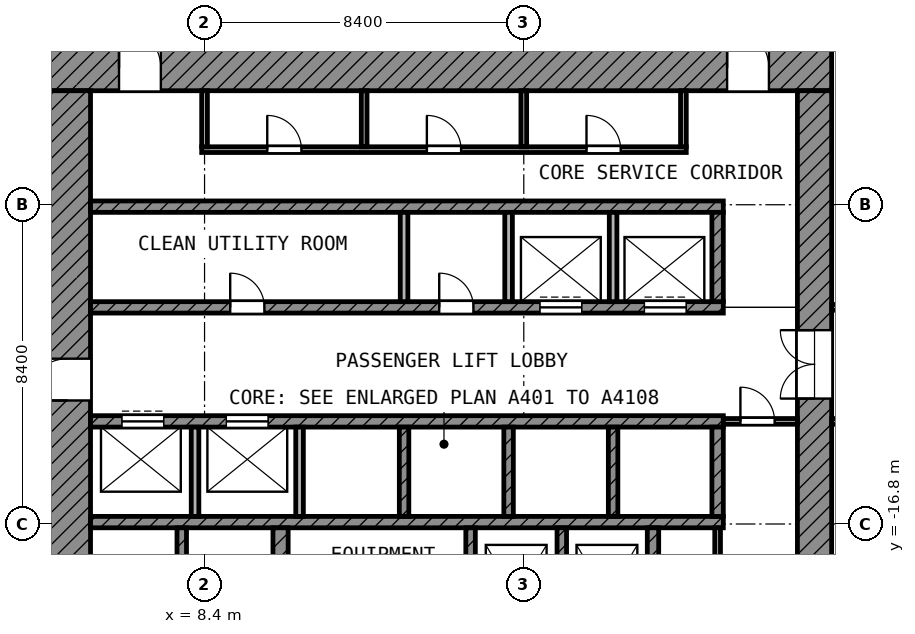
"""IFC4 building model, lengths in metres.
Left out: names, types, materials, properties, quantities, classifications, styles, units other than length and angle.
Written with IfcOpenShell. Run it as: python <this file> out.ifc"""

import sys

from ifc_helpers import new_model, si_unit, direction, frame, frame_2d, origin, place, context, subcontext, project, spatial, rectangle, extrude, element, fill, save


model = new_model("IFC4")
c1 = context("Model", 3, precision=1e-05, world=origin(), true_north=direction((0.0, 1.0)))
c2 = subcontext(c1, "Body", "Model", "MODEL_VIEW")
j1 = project(units=[si_unit("LENGTHUNIT", "METRE"), si_unit("PLANEANGLEUNIT", "RADIAN")], contexts=[c1])
p1 = place(None, origin())
s1 = spatial("IfcSite", under=j1, at=p1, CompositionType="ELEMENT")
p2 = place(p1, origin())
s2 = spatial("IfcBuilding", under=s1, at=p2, CompositionType="ELEMENT")
p3 = place(p2, frame((0.0, 0.0, 187.8)))
s3 = spatial("IfcBuildingStorey", under=s2, at=p3, CompositionType="ELEMENT", Elevation=187.8)
p4 = place(p3, frame((4.2, -4.8, 0.0), z_axis=(0.0, 0.0, 1.0), x_axis=(1.0, 0.0, 0.0)))
e1 = element("IfcWall", 1, at=p4, inside=s3, PredefinedType="SHEAR", context=c2, shape_type="SweptSolid", body=[
    extrude(rectangle(XDim=20.7, YDim=1.2, at=frame_2d((10.35, 0.0))), origin(), (0.0, 0.0, 1.0), 3.6),
])
p5 = place(p4, frame((1.95, 0.0, 0.0)))
e2 = element("IfcOpeningElement", 2, at=p5, cuts=e1, PredefinedType="OPENING", context=c2, shape_type="SweptSolid", body=[
    extrude(rectangle(XDim=1.1, YDim=2.1, at=frame_2d((0.55, 1.05))), frame((0.0, 0.61, 0.0), z_axis=(0.0, -1.0, 0.0), x_axis=(1.0, 0.0, 0.0)), (0.0, 0.0, 1.0), 1.22),
])
p6 = place(p4, frame((17.95, 0.0, 0.0)))
e3 = element("IfcOpeningElement", 3, at=p6, cuts=e1, PredefinedType="OPENING", context=c2, shape_type="SweptSolid", body=[
    extrude(rectangle(XDim=1.1, YDim=2.1, at=frame_2d((0.55, 1.05))), frame((0.0, 0.61, 0.0), z_axis=(0.0, -1.0, 0.0), x_axis=(1.0, 0.0, 0.0)), (0.0, 0.0, 1.0), 1.22),
])
p7 = place(p3, frame((4.8, -24.9, 0.0), z_axis=(0.0, 0.0, 1.0), x_axis=(0.0, 1.0, 0.0)))
e4 = element("IfcWall", 4, at=p7, inside=s3, PredefinedType="SHEAR", context=c2, shape_type="SweptSolid", body=[
    extrude(rectangle(XDim=19.5, YDim=1.2, at=frame_2d((9.75, 0.0))), origin(), (0.0, 0.0, 1.0), 3.6),
])
p8 = place(p7, frame((11.35, 0.0, 0.0)))
e5 = element("IfcOpeningElement", 5, at=p8, cuts=e4, PredefinedType="OPENING", context=c2, shape_type="SweptSolid", body=[
    extrude(rectangle(XDim=1.1, YDim=2.1, at=frame_2d((0.55, 1.05))), frame((0.0, 0.61, 0.0), z_axis=(0.0, -1.0, 0.0), x_axis=(1.0, 0.0, 0.0)), (0.0, 0.0, 1.0), 1.22),
])
p9 = place(p7, frame((2.05, 0.0, 0.0)))
e6 = element("IfcOpeningElement", 6, at=p9, cuts=e4, PredefinedType="OPENING", context=c2, shape_type="SweptSolid", body=[
    extrude(rectangle(XDim=1.1, YDim=2.1, at=frame_2d((0.55, 1.05))), frame((0.0, 0.61, 0.0), z_axis=(0.0, -1.0, 0.0), x_axis=(1.0, 0.0, 0.0)), (0.0, 0.0, 1.0), 1.22),
])
p10 = place(p3, frame((24.45, -24.0, 0.0), z_axis=(0.0, 0.0, 1.0), x_axis=(0.0, 1.0, 0.0)))
e7 = element("IfcWall", 7, at=p10, inside=s3, PredefinedType="SHEAR", context=c2, shape_type="SweptSolid", body=[
    extrude(rectangle(XDim=18.6, YDim=0.9, at=frame_2d((9.3, 0.0))), origin(), (0.0, 0.0, 1.0), 3.6),
])
p11 = place(p10, frame((10.5, 0.0, 0.0)))
e8 = element("IfcOpeningElement", 8, at=p11, cuts=e7, PredefinedType="OPENING", context=c2, shape_type="SweptSolid", body=[
    extrude(rectangle(XDim=1.8, YDim=2.1, at=frame_2d((0.9, 1.05))), frame((0.0, 0.46, 0.0), z_axis=(0.0, -1.0, 0.0), x_axis=(1.0, 0.0, 0.0)), (0.0, 0.0, 1.0), 0.92),
])
p12 = place(p3, frame((5.4, -8.45, 0.0), z_axis=(0.0, 0.0, 1.0), x_axis=(1.0, 0.0, 0.0)))
e9 = element("IfcWall", 9, at=p12, inside=s3, PredefinedType="SHEAR", context=c2, shape_type="SweptSolid", body=[
    extrude(rectangle(XDim=16.65, YDim=0.3, at=frame_2d((8.325, 0.0))), origin(), (0.0, 0.0, 1.0), 3.6),
])
p13 = place(p3, frame((5.4, -11.1, 0.0), z_axis=(0.0, 0.0, 1.0), x_axis=(1.0, 0.0, 0.0)))
e10 = element("IfcWall", 10, at=p13, inside=s3, PredefinedType="SHEAR", context=c2, shape_type="SweptSolid", body=[
    extrude(rectangle(XDim=16.65, YDim=0.3, at=frame_2d((8.325, 0.0))), origin(), (0.0, 0.0, 1.0), 3.6),
])
p14 = place(p13, frame((11.825, 0.0, 0.0)))
e11 = element("IfcOpeningElement", 11, at=p14, cuts=e10, PredefinedType="OPENING", context=c2, shape_type="SweptSolid", body=[
    extrude(rectangle(XDim=1.1, YDim=2.1, at=frame_2d((0.55, 1.05))), frame((0.0, 0.16, 0.0), z_axis=(0.0, -1.0, 0.0), x_axis=(1.0, 0.0, 0.0)), (0.0, 0.0, 1.0), 0.32),
])
p15 = place(p13, frame((14.575, 0.0, 0.0)))
e12 = element("IfcOpeningElement", 12, at=p15, cuts=e10, PredefinedType="OPENING", context=c2, shape_type="SweptSolid", body=[
    extrude(rectangle(XDim=1.1, YDim=2.1, at=frame_2d((0.55, 1.05))), frame((0.0, 0.16, 0.0), z_axis=(0.0, -1.0, 0.0), x_axis=(1.0, 0.0, 0.0)), (0.0, 0.0, 1.0), 0.32),
])
p16 = place(p13, frame((3.675, 0.0, 0.0)))
e13 = element("IfcOpeningElement", 13, at=p16, cuts=e10, PredefinedType="OPENING", context=c2, shape_type="SweptSolid", body=[
    extrude(rectangle(XDim=0.9, YDim=2.1, at=frame_2d((0.45, 1.05))), frame((0.0, 0.16, 0.0), z_axis=(0.0, -1.0, 0.0), x_axis=(1.0, 0.0, 0.0)), (0.0, 0.0, 1.0), 0.32),
])
p17 = place(p13, frame((9.175, 0.0, 0.0)))
e14 = element("IfcOpeningElement", 14, at=p17, cuts=e10, PredefinedType="OPENING", context=c2, shape_type="SweptSolid", body=[
    extrude(rectangle(XDim=0.9, YDim=2.1, at=frame_2d((0.45, 1.05))), frame((0.0, 0.16, 0.0), z_axis=(0.0, -1.0, 0.0), x_axis=(1.0, 0.0, 0.0)), (0.0, 0.0, 1.0), 0.32),
])
p18 = place(p3, frame((5.4, -14.1, 0.0), z_axis=(0.0, 0.0, 1.0), x_axis=(1.0, 0.0, 0.0)))
e15 = element("IfcWall", 15, at=p18, inside=s3, PredefinedType="SHEAR", context=c2, shape_type="SweptSolid", body=[
    extrude(rectangle(XDim=16.65, YDim=0.3, at=frame_2d((8.325, 0.0))), origin(), (0.0, 0.0, 1.0), 3.6),
])
p19 = place(p18, frame((0.825, 0.0, 0.0)))
e16 = element("IfcOpeningElement", 16, at=p19, cuts=e15, PredefinedType="OPENING", context=c2, shape_type="SweptSolid", body=[
    extrude(rectangle(XDim=1.1, YDim=2.1, at=frame_2d((0.55, 1.05))), frame((0.0, 0.16, 0.0), z_axis=(0.0, -1.0, 0.0), x_axis=(1.0, 0.0, 0.0)), (0.0, 0.0, 1.0), 0.32),
])
p20 = place(p18, frame((3.575, 0.0, 0.0)))
e17 = element("IfcOpeningElement", 17, at=p20, cuts=e15, PredefinedType="OPENING", context=c2, shape_type="SweptSolid", body=[
    extrude(rectangle(XDim=1.1, YDim=2.1, at=frame_2d((0.55, 1.05))), frame((0.0, 0.16, 0.0), z_axis=(0.0, -1.0, 0.0), x_axis=(1.0, 0.0, 0.0)), (0.0, 0.0, 1.0), 0.32),
])
p21 = place(p3, frame((5.4, -16.75, 0.0), z_axis=(0.0, 0.0, 1.0), x_axis=(1.0, 0.0, 0.0)))
e18 = element("IfcWall", 18, at=p21, inside=s3, PredefinedType="SHEAR", context=c2, shape_type="SweptSolid", body=[
    extrude(rectangle(XDim=16.65, YDim=0.3, at=frame_2d((8.325, 0.0))), origin(), (0.0, 0.0, 1.0), 3.6),
])
p22 = place(p3, frame((10.4, -20.05, 0.0), z_axis=(0.0, 0.0, 1.0), x_axis=(0.0, 1.0, 0.0)))
e19 = element("IfcWall", 19, at=p22, inside=s3, PredefinedType="SHEAR", context=c2, shape_type="SweptSolid", body=[
    extrude(rectangle(XDim=3.15, YDim=0.4, at=frame_2d((1.575, 0.0))), origin(), (0.0, 0.0, 1.0), 3.6),
])
p23 = place(p3, frame((20.2, -20.35, 0.0), z_axis=(0.0, 0.0, 1.0), x_axis=(0.0, 1.0, 0.0)))
e20 = element("IfcWall", 20, at=p23, inside=s3, PredefinedType="SHEAR", context=c2, shape_type="SweptSolid", body=[
    extrude(rectangle(XDim=3.45, YDim=0.3, at=frame_2d((1.725, 0.0))), origin(), (0.0, 0.0, 1.0), 3.6),
])
p24 = place(p3, frame((21.9, -10.95, 0.0), z_axis=(0.0, 0.0, 1.0), x_axis=(0.0, 1.0, 0.0)))
e21 = element("IfcWall", 21, at=p24, inside=s3, PredefinedType="SHEAR", context=c2, shape_type="SweptSolid", body=[
    extrude(rectangle(XDim=2.35, YDim=0.3, at=frame_2d((1.175, 0.0))), origin(), (0.0, 0.0, 1.0), 3.6),
])
p25 = place(p3, frame((21.9, -16.6, 0.0), z_axis=(0.0, 0.0, 1.0), x_axis=(0.0, 1.0, 0.0)))
e22 = element("IfcWall", 22, at=p25, inside=s3, PredefinedType="SHEAR", context=c2, shape_type="SweptSolid", body=[
    extrude(rectangle(XDim=2.35, YDim=0.3, at=frame_2d((1.175, 0.0))), origin(), (0.0, 0.0, 1.0), 3.6),
])
for number, where, z_axis, x_axis in (
    (23, (7.8, -20.05, 0.0), (0.0, 0.0, 1.0), (0.0, 1.0, 0.0)),
    (24, (15.4, -20.05, 0.0), (0.0, 0.0, 1.0), (0.0, 1.0, 0.0)),
    (25, (17.8, -20.05, 0.0), (0.0, 0.0, 1.0), (0.0, 1.0, 0.0)),
):
    element("IfcWall", number, at=place(p3, frame(where, z_axis=z_axis, x_axis=x_axis)), inside=s3, PredefinedType="SHEAR", context=c2, shape_type="SweptSolid", body=[
        extrude(rectangle(XDim=3.15, YDim=0.25, at=frame_2d((1.575, 0.0))), origin(), (0.0, 0.0, 1.0), 3.6),
    ])
for number, where, z_axis, x_axis in (
    (26, (13.65, -10.95, 0.0), (0.0, 0.0, 1.0), (0.0, 1.0, 0.0)),
    (27, (16.4, -10.95, 0.0), (0.0, 0.0, 1.0), (0.0, 1.0, 0.0)),
    (28, (19.15, -10.95, 0.0), (0.0, 0.0, 1.0), (0.0, 1.0, 0.0)),
):
    element("IfcWall", number, at=place(p3, frame(where, z_axis=z_axis, x_axis=x_axis)), inside=s3, PredefinedType="PARTITIONING", context=c2, shape_type="SweptSolid", body=[
        extrude(rectangle(XDim=2.35, YDim=0.2, at=frame_2d((1.175, 0.0))), origin(), (0.0, 0.0, 1.0), 3.6),
    ])
for number, where, z_axis, x_axis in (
    (29, (8.15, -16.6, 0.0), (0.0, 0.0, 1.0), (0.0, 1.0, 0.0)),
    (30, (10.9, -16.6, 0.0), (0.0, 0.0, 1.0), (0.0, 1.0, 0.0)),
):
    element("IfcWall", number, at=place(p3, frame(where, z_axis=z_axis, x_axis=x_axis)), inside=s3, PredefinedType="PARTITIONING", context=c2, shape_type="SweptSolid", body=[
        extrude(rectangle(XDim=2.35, YDim=0.2, at=frame_2d((1.175, 0.0))), origin(), (0.0, 0.0, 1.0), 3.6),
    ])
for number, where, z_axis, x_axis in (
    (31, (13.65, -16.6, 0.0), (0.0, 0.0, 1.0), (0.0, 1.0, 0.0)),
    (32, (16.4, -16.6, 0.0), (0.0, 0.0, 1.0), (0.0, 1.0, 0.0)),
    (33, (19.15, -16.6, 0.0), (0.0, 0.0, 1.0), (0.0, 1.0, 0.0)),
):
    element("IfcWall", number, at=place(p3, frame(where, z_axis=z_axis, x_axis=x_axis)), inside=s3, PredefinedType="SHEAR", context=c2, shape_type="SweptSolid", body=[
        extrude(rectangle(XDim=2.35, YDim=0.25, at=frame_2d((1.175, 0.0))), origin(), (0.0, 0.0, 1.0), 3.6),
    ])
p26 = place(p3, frame((21.9, -19.05, 0.0), z_axis=(0.0, 0.0, 1.0), x_axis=(0.0, 1.0, 0.0)))
e34 = element("IfcWall", 34, at=p26, inside=s3, PredefinedType="PARTITIONING", context=c2, shape_type="SweptSolid", body=[
    extrude(rectangle(XDim=2.15, YDim=0.15, at=frame_2d((1.075, 0.0))), origin(), (0.0, 0.0, 1.0), 3.6),
])
p27 = place(p3, frame((22.05, -14.1, 0.0), z_axis=(0.0, 0.0, 1.0), x_axis=(1.0, 0.0, 0.0)))
e35 = element("IfcWall", 35, at=p27, inside=s3, PredefinedType="PARTITIONING", context=c2, shape_type="SweptSolid", body=[
    extrude(rectangle(XDim=1.95, YDim=0.15, at=frame_2d((0.975, 0.0))), origin(), (0.0, 0.0, 1.0), 3.6),
])
p28 = place(p27, frame((0.45, 0.0, 0.0)))
e36 = element("IfcOpeningElement", 36, at=p28, cuts=e35, PredefinedType="OPENING", context=c2, shape_type="SweptSolid", body=[
    extrude(rectangle(XDim=0.9, YDim=2.1, at=frame_2d((0.45, 1.05))), frame((0.0, 0.085, 0.0), z_axis=(0.0, -1.0, 0.0), x_axis=(1.0, 0.0, 0.0)), (0.0, 0.0, 1.0), 0.17),
])
p29 = place(p3, frame((8.325, -6.95, 0.0), z_axis=(0.0, 0.0, 1.0), x_axis=(1.0, 0.0, 0.0)))
e37 = element("IfcWall", 37, at=p29, inside=s3, PredefinedType="PARTITIONING", context=c2, shape_type="SweptSolid", body=[
    extrude(rectangle(XDim=12.75, YDim=0.15, at=frame_2d((6.375, 0.0))), origin(), (0.0, 0.0, 1.0), 3.6),
])
p30 = place(p29, frame((1.725, 0.0, 0.0)))
e38 = element("IfcOpeningElement", 38, at=p30, cuts=e37, PredefinedType="OPENING", context=c2, shape_type="SweptSolid", body=[
    extrude(rectangle(XDim=0.9, YDim=2.1, at=frame_2d((0.45, 1.05))), frame((0.0, 0.085, 0.0), z_axis=(0.0, -1.0, 0.0), x_axis=(1.0, 0.0, 0.0)), (0.0, 0.0, 1.0), 0.17),
])
p31 = place(p29, frame((5.925, 0.0, 0.0)))
e39 = element("IfcOpeningElement", 39, at=p31, cuts=e37, PredefinedType="OPENING", context=c2, shape_type="SweptSolid", body=[
    extrude(rectangle(XDim=0.9, YDim=2.1, at=frame_2d((0.45, 1.05))), frame((0.0, 0.085, 0.0), z_axis=(0.0, -1.0, 0.0), x_axis=(1.0, 0.0, 0.0)), (0.0, 0.0, 1.0), 0.17),
])
p32 = place(p29, frame((10.125, 0.0, 0.0)))
e40 = element("IfcOpeningElement", 40, at=p32, cuts=e37, PredefinedType="OPENING", context=c2, shape_type="SweptSolid", body=[
    extrude(rectangle(XDim=0.9, YDim=2.1, at=frame_2d((0.45, 1.05))), frame((0.0, 0.085, 0.0), z_axis=(0.0, -1.0, 0.0), x_axis=(1.0, 0.0, 0.0)), (0.0, 0.0, 1.0), 0.17),
])
for number, where, z_axis, x_axis in (
    (41, (8.4, -6.875, 0.0), (0.0, 0.0, 1.0), (0.0, 1.0, 0.0)),
    (42, (12.6, -6.875, 0.0), (0.0, 0.0, 1.0), (0.0, 1.0, 0.0)),
    (43, (16.8, -6.875, 0.0), (0.0, 0.0, 1.0), (0.0, 1.0, 0.0)),
    (44, (21.0, -6.875, 0.0), (0.0, 0.0, 1.0), (0.0, 1.0, 0.0)),
):
    element("IfcWall", number, at=place(p3, frame(where, z_axis=z_axis, x_axis=x_axis)), inside=s3, PredefinedType="PARTITIONING", context=c2, shape_type="SweptSolid", body=[
        extrude(rectangle(XDim=1.475, YDim=0.15, at=frame_2d((0.738, 0.0))), origin(), (0.0, 0.0, 1.0), 3.6),
    ])
p33 = place(p3, frame((24.9, -14.1, 0.0), z_axis=(0.0, 0.0, 1.0), x_axis=(1.0, 0.0, 0.0)))
e45 = element("IfcWall", 45, at=p33, inside=s3, PredefinedType="PARTITIONING", context=c2, shape_type="SweptSolid", body=[
    extrude(rectangle(XDim=4.425, YDim=0.15, at=frame_2d((2.212, 0.0))), origin(), (0.0, 0.0, 1.0), 3.6),
])
p34 = place(p33, frame((1.65, 0.0, 0.0)))
e46 = element("IfcOpeningElement", 46, at=p34, cuts=e45, PredefinedType="OPENING", context=c2, shape_type="SweptSolid", body=[
    extrude(rectangle(XDim=1.5, YDim=2.1, at=frame_2d((0.75, 1.05))), frame((0.0, 0.085, 0.0), z_axis=(0.0, -1.0, 0.0), x_axis=(1.0, 0.0, 0.0)), (0.0, 0.0, 1.0), 0.17),
])
p35 = place(p3, frame((24.9, -11.1, 0.0), z_axis=(0.0, 0.0, 1.0), x_axis=(1.0, 0.0, 0.0)))
e47 = element("IfcWall", 47, at=p35, inside=s3, PredefinedType="PARTITIONING", context=c2, shape_type="SweptSolid", body=[
    extrude(rectangle(XDim=4.498, YDim=0.15, at=frame_2d((2.249, 0.0))), origin(), (0.0, 0.0, 1.0), 3.6),
])
p36 = place(p35, frame((1.5, 0.0, 0.0)))
e48 = element("IfcOpeningElement", 48, at=p36, cuts=e47, PredefinedType="OPENING", context=c2, shape_type="SweptSolid", body=[
    extrude(rectangle(XDim=1.2, YDim=2.1, at=frame_2d((0.6, 1.05))), frame((0.0, 0.085, 0.0), z_axis=(0.0, -1.0, 0.0), x_axis=(1.0, 0.0, 0.0)), (0.0, 0.0, 1.0), 0.17),
])
p37 = place(p14, origin())
e49 = element("IfcDoor", 49, at=p37, inside=s3, OperationType="DOUBLE_DOOR_SLIDING", PredefinedType="DOOR", context=c2, shape_type="SweptSolid", body=[
    extrude(rectangle(XDim=1.1, YDim=2.1, at=frame_2d((0.55, 1.05))), frame((0.0, 0.025, 0.0), z_axis=(0.0, -1.0, 0.0), x_axis=(1.0, 0.0, 0.0)), (0.0, 0.0, 1.0), 0.05),
])
fill(e11, e49)
p38 = place(p15, origin())
e50 = element("IfcDoor", 50, at=p38, inside=s3, OperationType="DOUBLE_DOOR_SLIDING", PredefinedType="DOOR", context=c2, shape_type="SweptSolid", body=[
    extrude(rectangle(XDim=1.1, YDim=2.1, at=frame_2d((0.55, 1.05))), frame((0.0, 0.025, 0.0), z_axis=(0.0, -1.0, 0.0), x_axis=(1.0, 0.0, 0.0)), (0.0, 0.0, 1.0), 0.05),
])
fill(e12, e50)
p39 = place(p19, origin())
e51 = element("IfcDoor", 51, at=p39, inside=s3, OperationType="DOUBLE_DOOR_SLIDING", PredefinedType="DOOR", context=c2, shape_type="SweptSolid", body=[
    extrude(rectangle(XDim=1.1, YDim=2.1, at=frame_2d((0.55, 1.05))), frame((0.0, 0.025, 0.0), z_axis=(0.0, -1.0, 0.0), x_axis=(1.0, 0.0, 0.0)), (0.0, 0.0, 1.0), 0.05),
])
fill(e16, e51)
p40 = place(p20, origin())
e52 = element("IfcDoor", 52, at=p40, inside=s3, OperationType="DOUBLE_DOOR_SLIDING", PredefinedType="DOOR", context=c2, shape_type="SweptSolid", body=[
    extrude(rectangle(XDim=1.1, YDim=2.1, at=frame_2d((0.55, 1.05))), frame((0.0, 0.025, 0.0), z_axis=(0.0, -1.0, 0.0), x_axis=(1.0, 0.0, 0.0)), (0.0, 0.0, 1.0), 0.05),
])
fill(e17, e52)
p41 = place(p8, origin())
e53 = element("IfcDoor", 53, at=p41, inside=s3, OperationType="SINGLE_SWING_LEFT", PredefinedType="DOOR", context=c2, shape_type="SweptSolid", body=[
    extrude(rectangle(XDim=1.1, YDim=2.1, at=frame_2d((0.55, 1.05))), frame((0.0, 0.025, 0.0), z_axis=(0.0, -1.0, 0.0), x_axis=(1.0, 0.0, 0.0)), (0.0, 0.0, 1.0), 0.05),
])
fill(e5, e53)
p42 = place(p5, origin())
e54 = element("IfcDoor", 54, at=p42, inside=s3, OperationType="SINGLE_SWING_LEFT", PredefinedType="DOOR", context=c2, shape_type="SweptSolid", body=[
    extrude(rectangle(XDim=1.1, YDim=2.1, at=frame_2d((0.55, 1.05))), frame((0.0, 0.025, 0.0), z_axis=(0.0, -1.0, 0.0), x_axis=(1.0, 0.0, 0.0)), (0.0, 0.0, 1.0), 0.05),
])
fill(e2, e54)
p43 = place(p6, origin())
e55 = element("IfcDoor", 55, at=p43, inside=s3, OperationType="SINGLE_SWING_LEFT", PredefinedType="DOOR", context=c2, shape_type="SweptSolid", body=[
    extrude(rectangle(XDim=1.1, YDim=2.1, at=frame_2d((0.55, 1.05))), frame((0.0, 0.025, 0.0), z_axis=(0.0, -1.0, 0.0), x_axis=(1.0, 0.0, 0.0)), (0.0, 0.0, 1.0), 0.05),
])
fill(e3, e55)
p44 = place(p11, origin())
e56 = element("IfcDoor", 56, at=p44, inside=s3, OperationType="DOUBLE_DOOR_SINGLE_SWING", PredefinedType="DOOR", context=c2, shape_type="SweptSolid", body=[
    extrude(rectangle(XDim=1.8, YDim=2.1, at=frame_2d((0.9, 1.05))), frame((0.0, 0.025, 0.0), z_axis=(0.0, -1.0, 0.0), x_axis=(1.0, 0.0, 0.0)), (0.0, 0.0, 1.0), 0.05),
])
fill(e8, e56)
p45 = place(p30, origin())
e57 = element("IfcDoor", 57, at=p45, inside=s3, OperationType="SINGLE_SWING_LEFT", PredefinedType="DOOR", context=c2, shape_type="SweptSolid", body=[
    extrude(rectangle(XDim=0.9, YDim=2.1, at=frame_2d((0.45, 1.05))), frame((0.0, 0.025, 0.0), z_axis=(0.0, -1.0, 0.0), x_axis=(1.0, 0.0, 0.0)), (0.0, 0.0, 1.0), 0.05),
])
fill(e38, e57)
p46 = place(p31, origin())
e58 = element("IfcDoor", 58, at=p46, inside=s3, OperationType="SINGLE_SWING_LEFT", PredefinedType="DOOR", context=c2, shape_type="SweptSolid", body=[
    extrude(rectangle(XDim=0.9, YDim=2.1, at=frame_2d((0.45, 1.05))), frame((0.0, 0.025, 0.0), z_axis=(0.0, -1.0, 0.0), x_axis=(1.0, 0.0, 0.0)), (0.0, 0.0, 1.0), 0.05),
])
fill(e39, e58)
p47 = place(p32, origin())
e59 = element("IfcDoor", 59, at=p47, inside=s3, OperationType="SINGLE_SWING_LEFT", PredefinedType="DOOR", context=c2, shape_type="SweptSolid", body=[
    extrude(rectangle(XDim=0.9, YDim=2.1, at=frame_2d((0.45, 1.05))), frame((0.0, 0.025, 0.0), z_axis=(0.0, -1.0, 0.0), x_axis=(1.0, 0.0, 0.0)), (0.0, 0.0, 1.0), 0.05),
])
fill(e40, e59)
p48 = place(p28, origin())
e60 = element("IfcDoor", 60, at=p48, inside=s3, OperationType="SINGLE_SWING_LEFT", PredefinedType="DOOR", context=c2, shape_type="SweptSolid", body=[
    extrude(rectangle(XDim=0.9, YDim=2.1, at=frame_2d((0.45, 1.05))), frame((0.0, 0.025, 0.0), z_axis=(0.0, -1.0, 0.0), x_axis=(1.0, 0.0, 0.0)), (0.0, 0.0, 1.0), 0.05),
])
fill(e36, e60)
p49 = place(p16, origin())
e61 = element("IfcDoor", 61, at=p49, inside=s3, OperationType="SINGLE_SWING_LEFT", PredefinedType="DOOR", context=c2, shape_type="SweptSolid", body=[
    extrude(rectangle(XDim=0.9, YDim=2.1, at=frame_2d((0.45, 1.05))), frame((0.0, 0.025, 0.0), z_axis=(0.0, -1.0, 0.0), x_axis=(1.0, 0.0, 0.0)), (0.0, 0.0, 1.0), 0.05),
])
fill(e13, e61)
p50 = place(p17, origin())
e62 = element("IfcDoor", 62, at=p50, inside=s3, OperationType="SINGLE_SWING_LEFT", PredefinedType="DOOR", context=c2, shape_type="SweptSolid", body=[
    extrude(rectangle(XDim=0.9, YDim=2.1, at=frame_2d((0.45, 1.05))), frame((0.0, 0.025, 0.0), z_axis=(0.0, -1.0, 0.0), x_axis=(1.0, 0.0, 0.0)), (0.0, 0.0, 1.0), 0.05),
])
fill(e14, e62)
save(model, sys.argv[1])
